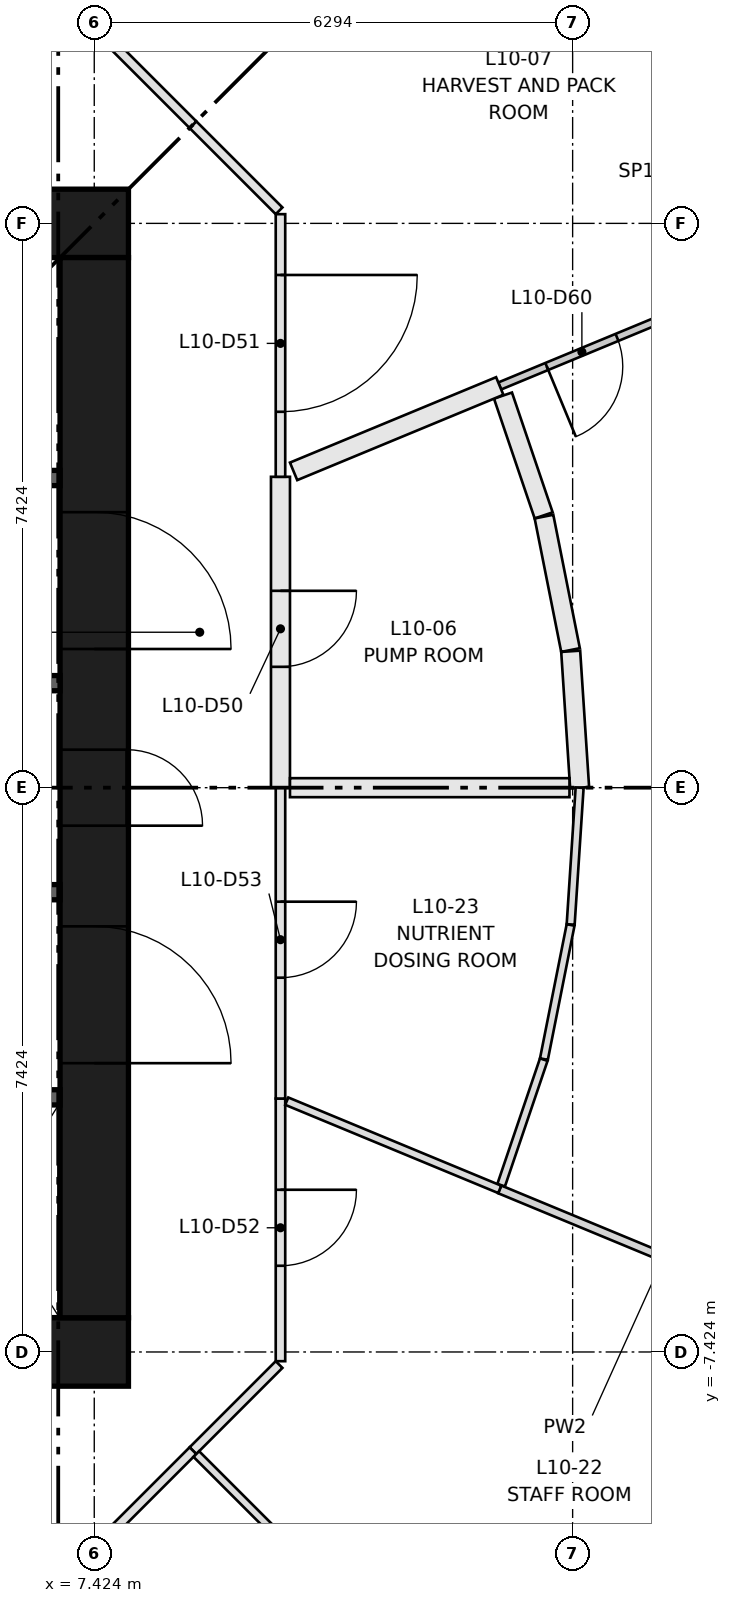
"""IFC4 building model, lengths in metres.
Left out: names, types, materials, properties, quantities, classifications, styles, units other than length and angle.
Written with IfcOpenShell. Run it as: python <this file> out.ifc"""

import sys

from ifc_helpers import new_model, si_unit, direction, frame, frame_2d, origin, place, context, subcontext, project, spatial, rectangle, extrude, element, fill, save


model = new_model("IFC4")
c1 = context("Model", 3, precision=1e-05, world=origin(), true_north=direction((0.0, 1.0)))
c2 = subcontext(c1, "Body", "Model", "MODEL_VIEW")
j1 = project(units=[si_unit("LENGTHUNIT", "METRE"), si_unit("PLANEANGLEUNIT", "RADIAN")], contexts=[c1])
p1 = place(None, origin())
s1 = spatial("IfcSite", under=j1, at=p1, CompositionType="ELEMENT")
p2 = place(p1, origin())
s2 = spatial("IfcBuilding", under=s1, at=p2, CompositionType="ELEMENT")
p3 = place(p2, frame((0.0, 0.0, 40.8)))
s3 = spatial("IfcBuildingStorey", under=s2, at=p3, CompositionType="ELEMENT", Elevation=40.8)
for number, where, z_axis, x_axis in (
    (1, (-7.874, -7.424, 0.0), (0.0, 0.0, 1.0), (1.0, 0.0, 0.0)),
    (2, (-7.874, 7.424, 0.0), (0.0, 0.0, 1.0), (1.0, 0.0, 0.0)),
):
    element("IfcWall", number, at=place(p3, frame(where, z_axis=z_axis, x_axis=x_axis)), inside=s3, PredefinedType="SHEAR", context=c2, shape_type="SweptSolid", body=[
        extrude(rectangle(XDim=15.748, YDim=0.9, at=frame_2d((7.874, 0.0))), origin(), (0.0, 0.0, 1.0), 3.65),
    ])
p4 = place(p3, frame((7.424, -6.974, 0.0), z_axis=(0.0, 0.0, 1.0), x_axis=(0.0, 1.0, 0.0)))
e3 = element("IfcWall", 3, at=p4, inside=s3, PredefinedType="SHEAR", context=c2, shape_type="SweptSolid", body=[
    extrude(rectangle(XDim=13.948, YDim=0.9, at=frame_2d((6.974, 0.0))), origin(), (0.0, 0.0, 1.0), 3.65),
])
p5 = place(p4, frame((6.474, 0.0, 0.0)))
e4 = element("IfcOpeningElement", 4, at=p5, cuts=e3, PredefinedType="OPENING", context=c2, shape_type="SweptSolid", body=[
    extrude(rectangle(XDim=1.0, YDim=2.1, at=frame_2d((0.5, 1.05))), frame((0.0, 0.46, 0.0), z_axis=(0.0, -1.0, 0.0), x_axis=(1.0, 0.0, 0.0)), (0.0, 0.0, 1.0), 0.92),
])
p6 = place(p4, frame((3.35, 0.0, 0.0)))
e5 = element("IfcOpeningElement", 5, at=p6, cuts=e3, PredefinedType="OPENING", context=c2, shape_type="SweptSolid", body=[
    extrude(rectangle(XDim=1.8, YDim=2.1, at=frame_2d((0.9, 1.05))), frame((0.0, 0.46, 0.0), z_axis=(0.0, -1.0, 0.0), x_axis=(1.0, 0.0, 0.0)), (0.0, 0.0, 1.0), 0.92),
])
p7 = place(p4, frame((8.799, 0.0, 0.0)))
e6 = element("IfcOpeningElement", 6, at=p7, cuts=e3, PredefinedType="OPENING", context=c2, shape_type="SweptSolid", body=[
    extrude(rectangle(XDim=1.8, YDim=2.1, at=frame_2d((0.9, 1.05))), frame((0.0, 0.46, 0.0), z_axis=(0.0, -1.0, 0.0), x_axis=(1.0, 0.0, 0.0)), (0.0, 0.0, 1.0), 0.92),
])
p8 = place(p3, frame((-6.974, -4.074, 0.0), z_axis=(0.0, 0.0, 1.0), x_axis=(1.0, 0.0, 0.0)))
e7 = element("IfcWall", 7, at=p8, inside=s3, PredefinedType="SHEAR", context=c2, shape_type="SweptSolid", body=[
    extrude(rectangle(XDim=13.948, YDim=0.2, at=frame_2d((6.974, 0.0))), origin(), (0.0, 0.0, 1.0), 3.3),
])
p9 = place(p8, frame((0.918, 0.0, 0.0)))
e8 = element("IfcOpeningElement", 8, at=p9, cuts=e7, PredefinedType="OPENING", context=c2, shape_type="SweptSolid", body=[
    extrude(rectangle(XDim=1.1, YDim=2.1, at=frame_2d((0.55, 1.05))), frame((0.0, 0.11, 0.0), z_axis=(0.0, -1.0, 0.0), x_axis=(1.0, 0.0, 0.0)), (0.0, 0.0, 1.0), 0.22),
])
p10 = place(p8, frame((4.055, 0.0, 0.0)))
e9 = element("IfcOpeningElement", 9, at=p10, cuts=e7, PredefinedType="OPENING", context=c2, shape_type="SweptSolid", body=[
    extrude(rectangle(XDim=1.1, YDim=2.1, at=frame_2d((0.55, 1.05))), frame((0.0, 0.11, 0.0), z_axis=(0.0, -1.0, 0.0), x_axis=(1.0, 0.0, 0.0)), (0.0, 0.0, 1.0), 0.22),
])
p11 = place(p8, frame((6.658, 0.0, 0.0)))
e10 = element("IfcOpeningElement", 10, at=p11, cuts=e7, PredefinedType="OPENING", context=c2, shape_type="SweptSolid", body=[
    extrude(rectangle(XDim=1.0, YDim=2.1, at=frame_2d((0.5, 1.05))), frame((0.0, 0.11, 0.0), z_axis=(0.0, -1.0, 0.0), x_axis=(1.0, 0.0, 0.0)), (0.0, 0.0, 1.0), 0.22),
])
p12 = place(p8, frame((8.627, 0.0, 0.0)))
e11 = element("IfcOpeningElement", 11, at=p12, cuts=e7, PredefinedType="OPENING", context=c2, shape_type="SweptSolid", body=[
    extrude(rectangle(XDim=1.0, YDim=2.1, at=frame_2d((0.5, 1.05))), frame((0.0, 0.11, 0.0), z_axis=(0.0, -1.0, 0.0), x_axis=(1.0, 0.0, 0.0)), (0.0, 0.0, 1.0), 0.22),
])
p13 = place(p8, frame((10.595, 0.0, 0.0)))
e12 = element("IfcOpeningElement", 12, at=p13, cuts=e7, PredefinedType="OPENING", context=c2, shape_type="SweptSolid", body=[
    extrude(rectangle(XDim=1.0, YDim=2.1, at=frame_2d((0.5, 1.05))), frame((0.0, 0.11, 0.0), z_axis=(0.0, -1.0, 0.0), x_axis=(1.0, 0.0, 0.0)), (0.0, 0.0, 1.0), 0.22),
])
p14 = place(p8, frame((12.564, 0.0, 0.0)))
e13 = element("IfcOpeningElement", 13, at=p14, cuts=e7, PredefinedType="OPENING", context=c2, shape_type="SweptSolid", body=[
    extrude(rectangle(XDim=1.0, YDim=2.1, at=frame_2d((0.5, 1.05))), frame((0.0, 0.11, 0.0), z_axis=(0.0, -1.0, 0.0), x_axis=(1.0, 0.0, 0.0)), (0.0, 0.0, 1.0), 0.22),
])
p15 = place(p3, frame((0.0, 4.074, 0.0), z_axis=(0.0, 0.0, 1.0), x_axis=(1.0, 0.0, 0.0)))
e14 = element("IfcWall", 14, at=p15, inside=s3, PredefinedType="SHEAR", context=c2, shape_type="SweptSolid", body=[
    extrude(rectangle(XDim=6.974, YDim=0.2, at=frame_2d((3.487, 0.0))), origin(), (0.0, 0.0, 1.0), 3.3),
])
p16 = place(p15, frame((0.754, 0.0, 0.0)))
e15 = element("IfcOpeningElement", 15, at=p16, cuts=e14, PredefinedType="OPENING", context=c2, shape_type="SweptSolid", body=[
    extrude(rectangle(XDim=1.0, YDim=2.1, at=frame_2d((0.5, 1.05))), frame((0.0, 0.11, 0.0), z_axis=(0.0, -1.0, 0.0), x_axis=(1.0, 0.0, 0.0)), (0.0, 0.0, 1.0), 0.22),
])
p17 = place(p15, frame((3.407, 0.0, 0.0)))
e16 = element("IfcOpeningElement", 16, at=p17, cuts=e14, PredefinedType="OPENING", context=c2, shape_type="SweptSolid", body=[
    extrude(rectangle(XDim=1.0, YDim=2.1, at=frame_2d((0.5, 1.05))), frame((0.0, 0.11, 0.0), z_axis=(0.0, -1.0, 0.0), x_axis=(1.0, 0.0, 0.0)), (0.0, 0.0, 1.0), 0.22),
])
p18 = place(p15, frame((5.79, 0.0, 0.0)))
e17 = element("IfcOpeningElement", 17, at=p18, cuts=e14, PredefinedType="OPENING", context=c2, shape_type="SweptSolid", body=[
    extrude(rectangle(XDim=0.8, YDim=2.1, at=frame_2d((0.4, 1.05))), frame((0.0, 0.11, 0.0), z_axis=(0.0, -1.0, 0.0), x_axis=(1.0, 0.0, 0.0)), (0.0, 0.0, 1.0), 0.22),
])
for number, where, z_axis, x_axis in (
    (18, (4.374, -1.375, 0.0), (0.0, 0.0, 1.0), (1.0, 0.0, 0.0)),
    (19, (4.374, 1.375, 0.0), (0.0, 0.0, 1.0), (1.0, 0.0, 0.0)),
):
    element("IfcWall", number, at=place(p3, frame(where, z_axis=z_axis, x_axis=x_axis)), inside=s3, PredefinedType="SHEAR", context=c2, shape_type="SweptSolid", body=[
        extrude(rectangle(XDim=2.6, YDim=0.2, at=frame_2d((1.3, 0.0))), origin(), (0.0, 0.0, 1.0), 3.3),
    ])
p19 = place(p3, frame((9.874, 4.09, 0.0), z_axis=(0.0, 0.0, 1.0), x_axis=(0.0, -1.0, 0.0)))
e20 = element("IfcWall", 20, at=p19, inside=s3, PredefinedType="PARTITIONING", context=c2, shape_type="SweptSolid", body=[
    extrude(rectangle(XDim=4.09, YDim=0.25, at=frame_2d((2.045, 0.0))), origin(), (0.0, 0.0, 1.0), 3.3),
])
p20 = place(p19, frame((1.5, 0.0, 0.0)))
e21 = element("IfcOpeningElement", 21, at=p20, cuts=e20, PredefinedType="OPENING", context=c2, shape_type="SweptSolid", body=[
    extrude(rectangle(XDim=1.0, YDim=2.1, at=frame_2d((0.5, 1.05))), frame((0.0, 0.135, 0.0), z_axis=(0.0, -1.0, 0.0), x_axis=(1.0, 0.0, 0.0)), (0.0, 0.0, 1.0), 0.27),
])
p21 = place(p3, frame((8.722, 8.722, 0.0), z_axis=(0.0, 0.0, 1.0), x_axis=(0.70718294931, -0.707030604857, 0.0)))
e22 = element("IfcWall", 22, at=p21, inside=s3, PredefinedType="PARTITIONING", context=c2, shape_type="SweptSolid", body=[
    extrude(rectangle(XDim=1.603, YDim=0.125, at=frame_2d((0.801, 0.0))), origin(), (0.0, 0.0, 1.0), 3.3),
])
p22 = place(p3, frame((9.874, 7.545, 0.0), z_axis=(0.0, 0.0, 1.0), x_axis=(0.0, -1.0, 0.0)))
e23 = element("IfcWall", 23, at=p22, inside=s3, PredefinedType="PARTITIONING", context=c2, shape_type="SweptSolid", body=[
    extrude(rectangle(XDim=3.455, YDim=0.125, at=frame_2d((1.728, 0.0))), origin(), (0.0, 0.0, 1.0), 3.3),
])
p23 = place(p22, frame((0.8, 0.0, 0.0)))
e24 = element("IfcOpeningElement", 24, at=p23, cuts=e23, PredefinedType="OPENING", context=c2, shape_type="SweptSolid", body=[
    extrude(rectangle(XDim=1.8, YDim=2.1, at=frame_2d((0.9, 1.05))), frame((0.0, 0.073, 0.0), z_axis=(0.0, -1.0, 0.0), x_axis=(1.0, 0.0, 0.0)), (0.0, 0.0, 1.0), 0.145),
])
p24 = place(p3, frame((9.856, -7.589, 0.0), z_axis=(0.0, 0.0, 1.0), x_axis=(-0.70718294931, -0.707030604857, 0.0)))
e25 = element("IfcWall", 25, at=p24, inside=s3, PredefinedType="PARTITIONING", context=c2, shape_type="SweptSolid", body=[
    extrude(rectangle(XDim=1.603, YDim=0.125, at=frame_2d((0.801, 0.0))), origin(), (0.0, 0.0, 1.0), 3.3),
])
p25 = place(p3, frame((9.874, -4.09, 0.0), z_axis=(0.0, 0.0, 1.0), x_axis=(0.0, -1.0, 0.0)))
e26 = element("IfcWall", 26, at=p25, inside=s3, PredefinedType="PARTITIONING", context=c2, shape_type="SweptSolid", body=[
    extrude(rectangle(XDim=3.455, YDim=0.125, at=frame_2d((1.728, 0.0))), origin(), (0.0, 0.0, 1.0), 3.3),
])
p26 = place(p25, frame((1.2, 0.0, 0.0)))
e27 = element("IfcOpeningElement", 27, at=p26, cuts=e26, PredefinedType="OPENING", context=c2, shape_type="SweptSolid", body=[
    extrude(rectangle(XDim=1.0, YDim=2.1, at=frame_2d((0.5, 1.05))), frame((0.0, 0.073, 0.0), z_axis=(0.0, -1.0, 0.0), x_axis=(1.0, 0.0, 0.0)), (0.0, 0.0, 1.0), 0.145),
])
p27 = place(p3, frame((9.874, 0.0, 0.0), z_axis=(0.0, 0.0, 1.0), x_axis=(0.0, -1.0, 0.0)))
e28 = element("IfcWall", 28, at=p27, inside=s3, PredefinedType="PARTITIONING", context=c2, shape_type="SweptSolid", body=[
    extrude(rectangle(XDim=4.09, YDim=0.125, at=frame_2d((2.045, 0.0))), origin(), (0.0, 0.0, 1.0), 3.3),
])
p28 = place(p27, frame((1.5, 0.0, 0.0)))
e29 = element("IfcOpeningElement", 29, at=p28, cuts=e28, PredefinedType="OPENING", context=c2, shape_type="SweptSolid", body=[
    extrude(rectangle(XDim=1.0, YDim=2.1, at=frame_2d((0.5, 1.05))), frame((0.0, 0.073, 0.0), z_axis=(0.0, -1.0, 0.0), x_axis=(1.0, 0.0, 0.0)), (0.0, 0.0, 1.0), 0.145),
])
for number, where, z_axis, x_axis in (
    (30, (7.589, 9.856, 0.0), (0.0, 0.0, 1.0), (0.707, -0.707, 0.0)),
    (31, (8.722, -8.722, 0.0), (0.0, 0.0, 1.0), (-0.707, -0.707, 0.0)),
):
    element("IfcWall", number, at=place(p3, frame(where, z_axis=z_axis, x_axis=x_axis)), inside=s3, PredefinedType="PARTITIONING", context=c2, shape_type="SweptSolid", body=[
        extrude(rectangle(XDim=1.603, YDim=0.125, at=frame_2d((0.801, 0.0))), origin(), (0.0, 0.0, 1.0), 3.3),
    ])
p29 = place(p3, frame((13.337, 3.582, 0.0), z_axis=(0.0, 0.0, 1.0), x_axis=(-0.321458381335, 0.946923708157, 0.0)))
e32 = element("IfcWall", 32, at=p29, inside=s3, PredefinedType="PARTITIONING", context=c2, shape_type="SweptSolid", body=[
    extrude(rectangle(XDim=1.665, YDim=0.25, at=frame_2d((0.833, 0.0))), origin(), (0.0, 0.0, 1.0), 3.3),
])
p30 = place(p3, frame((13.69, 1.811, 0.0), z_axis=(0.0, 0.0, 1.0), x_axis=(-0.195014530736, 0.980800353182, 0.0)))
e33 = element("IfcWall", 33, at=p30, inside=s3, PredefinedType="PARTITIONING", context=c2, shape_type="SweptSolid", body=[
    extrude(rectangle(XDim=1.79, YDim=0.25, at=frame_2d((0.895, 0.0))), origin(), (0.0, 0.0, 1.0), 3.3),
])
p31 = place(p3, frame((13.81, 0.0, 0.0), z_axis=(0.0, 0.0, 1.0), x_axis=(-0.065437674742, 0.997856658406, 0.0)))
e34 = element("IfcWall", 34, at=p31, inside=s3, PredefinedType="PARTITIONING", context=c2, shape_type="SweptSolid", body=[
    extrude(rectangle(XDim=1.798, YDim=0.25, at=frame_2d((0.899, 0.0))), origin(), (0.0, 0.0, 1.0), 3.3),
])
p32 = place(p3, frame((17.073, 7.072, 0.0), z_axis=(0.0, 0.0, 1.0), x_axis=(-0.92387920118, -0.382684232268, 0.0)))
e35 = element("IfcWall", 35, at=p32, inside=s3, PredefinedType="PARTITIONING", context=c2, shape_type="SweptSolid", body=[
    extrude(rectangle(XDim=4.67, YDim=0.1, at=frame_2d((2.335, 0.0))), origin(), (0.0, 0.0, 1.0), 3.3),
])
p33 = place(p32, frame((3.0, 0.0, 0.0)))
e36 = element("IfcOpeningElement", 36, at=p33, cuts=e35, PredefinedType="OPENING", context=c2, shape_type="SweptSolid", body=[
    extrude(rectangle(XDim=1.0, YDim=2.1, at=frame_2d((0.5, 1.05))), frame((0.0, 0.06, 0.0), z_axis=(0.0, -1.0, 0.0), x_axis=(1.0, 0.0, 0.0)), (0.0, 0.0, 1.0), 0.12),
])
p34 = place(p3, frame((17.073, -7.072, 0.0), z_axis=(0.0, 0.0, 1.0), x_axis=(-0.92387920118, 0.382684232268, 0.0)))
e37 = element("IfcWall", 37, at=p34, inside=s3, PredefinedType="PARTITIONING", context=c2, shape_type="SweptSolid", body=[
    extrude(rectangle(XDim=4.67, YDim=0.11, at=frame_2d((2.335, 0.0))), origin(), (0.0, 0.0, 1.0), 3.3),
])
p35 = place(p3, frame((12.778, -5.229, 0.0), z_axis=(0.0, 0.0, 1.0), x_axis=(0.321513757885, 0.946904907311, 0.0)))
e38 = element("IfcWall", 38, at=p35, inside=s3, PredefinedType="PARTITIONING", context=c2, shape_type="SweptSolid", body=[
    extrude(rectangle(XDim=1.744, YDim=0.105, at=frame_2d((0.872, 0.0))), origin(), (0.0, 0.0, 1.0), 3.3),
])
p36 = place(p3, frame((13.34, -3.571, 0.0), z_axis=(0.0, 0.0, 1.0), x_axis=(0.195098478373, 0.980783657968, 0.0)))
e39 = element("IfcWall", 39, at=p36, inside=s3, PredefinedType="PARTITIONING", context=c2, shape_type="SweptSolid", body=[
    extrude(rectangle(XDim=1.8, YDim=0.105, at=frame_2d((0.9, 0.0))), origin(), (0.0, 0.0, 1.0), 3.3),
])
p37 = place(p3, frame((13.692, -1.799, 0.0), z_axis=(0.0, 0.0, 1.0), x_axis=(0.065395671101, 0.997859412042, 0.0)))
e40 = element("IfcWall", 40, at=p37, inside=s3, PredefinedType="PARTITIONING", context=c2, shape_type="SweptSolid", body=[
    extrude(rectangle(XDim=1.803, YDim=0.105, at=frame_2d((0.902, 0.0))), origin(), (0.0, 0.0, 1.0), 3.3),
])
p38 = place(p3, frame((10.047, 4.162, 0.0), z_axis=(0.0, 0.0, 1.0), x_axis=(0.92388200997, 0.382677451195, 0.0)))
e41 = element("IfcWall", 41, at=p38, inside=s3, PredefinedType="PARTITIONING", context=c2, shape_type="SweptSolid", body=[
    extrude(rectangle(XDim=2.935, YDim=0.25, at=frame_2d((1.468, 0.0))), origin(), (0.0, 0.0, 1.0), 3.3),
])
p39 = place(p3, frame((13.677, 0.0, 0.0), z_axis=(0.0, 0.0, 1.0), x_axis=(-1.0, 0.0, 0.0)))
e42 = element("IfcWall", 42, at=p39, inside=s3, PredefinedType="PARTITIONING", context=c2, shape_type="SweptSolid", body=[
    extrude(rectangle(XDim=3.677, YDim=0.25, at=frame_2d((1.839, 0.0))), origin(), (0.0, 0.0, 1.0), 3.3),
])
p40 = place(p3, frame((8.767, -8.767, 0.0), z_axis=(0.0, 0.0, 1.0), x_axis=(0.707106781187, -0.707106781187, 0.0)))
e43 = element("IfcWall", 43, at=p40, inside=s3, PredefinedType="PARTITIONING", context=c2, shape_type="SweptSolid", body=[
    extrude(rectangle(XDim=6.082, YDim=0.105, at=frame_2d((3.041, 0.0))), origin(), (0.0, 0.0, 1.0), 3.3),
])
p41 = place(p3, frame((9.957, -4.124, 0.0), z_axis=(0.0, 0.0, 1.0), x_axis=(0.923860842545, -0.382728550819, 0.0)))
e44 = element("IfcWall", 44, at=p41, inside=s3, PredefinedType="PARTITIONING", context=c2, shape_type="SweptSolid", body=[
    extrude(rectangle(XDim=3.033, YDim=0.105, at=frame_2d((1.517, 0.0))), origin(), (0.0, 0.0, 1.0), 3.3),
])
p42 = place(p5, frame((1.0, 0.0, 0.0), z_axis=(0.0, 0.0, 1.0), x_axis=(-1.0, 0.0, 0.0)))
e45 = element("IfcDoor", 45, at=p42, inside=s3, OperationType="SINGLE_SWING_LEFT", PredefinedType="DOOR", context=c2, shape_type="SweptSolid", body=[
    extrude(rectangle(XDim=1.0, YDim=2.1, at=frame_2d((0.5, 1.05))), frame((0.0, 0.45, 0.0), z_axis=(0.0, -1.0, 0.0), x_axis=(1.0, 0.0, 0.0)), (0.0, 0.0, 1.0), 0.05),
])
fill(e4, e45)
p43 = place(p6, frame((1.8, 0.0, 0.0), z_axis=(0.0, 0.0, 1.0), x_axis=(-1.0, 0.0, 0.0)))
e46 = element("IfcDoor", 46, at=p43, inside=s3, OperationType="DOUBLE_DOOR_SINGLE_SWING", PredefinedType="DOOR", context=c2, shape_type="SweptSolid", body=[
    extrude(rectangle(XDim=1.8, YDim=2.1, at=frame_2d((0.9, 1.05))), frame((0.0, 0.025, 0.0), z_axis=(0.0, -1.0, 0.0), x_axis=(1.0, 0.0, 0.0)), (0.0, 0.0, 1.0), 0.05),
])
fill(e5, e46)
p44 = place(p7, frame((1.8, 0.0, 0.0), z_axis=(0.0, 0.0, 1.0), x_axis=(-1.0, 0.0, 0.0)))
e47 = element("IfcDoor", 47, at=p44, inside=s3, OperationType="DOUBLE_DOOR_SINGLE_SWING", PredefinedType="DOOR", context=c2, shape_type="SweptSolid", body=[
    extrude(rectangle(XDim=1.8, YDim=2.1, at=frame_2d((0.9, 1.05))), frame((0.0, 0.025, 0.0), z_axis=(0.0, -1.0, 0.0), x_axis=(1.0, 0.0, 0.0)), (0.0, 0.0, 1.0), 0.05),
])
fill(e6, e47)
p45 = place(p20, origin())
e48 = element("IfcDoor", 48, at=p45, inside=s3, OperationType="SINGLE_SWING_LEFT", PredefinedType="DOOR", context=c2, shape_type="SweptSolid", body=[
    extrude(rectangle(XDim=1.0, YDim=2.1, at=frame_2d((0.5, 1.05))), frame((0.0, 0.025, 0.0), z_axis=(0.0, -1.0, 0.0), x_axis=(1.0, 0.0, 0.0)), (0.0, 0.0, 1.0), 0.05),
])
fill(e21, e48)
p46 = place(p23, origin())
e49 = element("IfcDoor", 49, at=p46, inside=s3, OperationType="DOUBLE_DOOR_SINGLE_SWING", PredefinedType="DOOR", context=c2, shape_type="SweptSolid", body=[
    extrude(rectangle(XDim=1.8, YDim=2.1, at=frame_2d((0.9, 1.05))), frame((0.0, 0.025, 0.0), z_axis=(0.0, -1.0, 0.0), x_axis=(1.0, 0.0, 0.0)), (0.0, 0.0, 1.0), 0.05),
])
fill(e24, e49)
p47 = place(p26, origin())
e50 = element("IfcDoor", 50, at=p47, inside=s3, OperationType="SINGLE_SWING_LEFT", PredefinedType="DOOR", context=c2, shape_type="SweptSolid", body=[
    extrude(rectangle(XDim=1.0, YDim=2.1, at=frame_2d((0.5, 1.05))), frame((0.0, 0.025, 0.0), z_axis=(0.0, -1.0, 0.0), x_axis=(1.0, 0.0, 0.0)), (0.0, 0.0, 1.0), 0.05),
])
fill(e27, e50)
p48 = place(p28, origin())
e51 = element("IfcDoor", 51, at=p48, inside=s3, OperationType="SINGLE_SWING_LEFT", PredefinedType="DOOR", context=c2, shape_type="SweptSolid", body=[
    extrude(rectangle(XDim=1.0, YDim=2.1, at=frame_2d((0.5, 1.05))), frame((0.0, 0.025, 0.0), z_axis=(0.0, -1.0, 0.0), x_axis=(1.0, 0.0, 0.0)), (0.0, 0.0, 1.0), 0.05),
])
fill(e29, e51)
p49 = place(p33, origin())
e52 = element("IfcDoor", 52, at=p49, inside=s3, OperationType="SINGLE_SWING_RIGHT", PredefinedType="DOOR", context=c2, shape_type="SweptSolid", body=[
    extrude(rectangle(XDim=1.0, YDim=2.1, at=frame_2d((0.5, 1.05))), frame((0.0, 0.025, 0.0), z_axis=(0.0, -1.0, 0.0), x_axis=(1.0, 0.0, 0.0)), (0.0, 0.0, 1.0), 0.05),
])
fill(e36, e52)
save(model, sys.argv[1])
